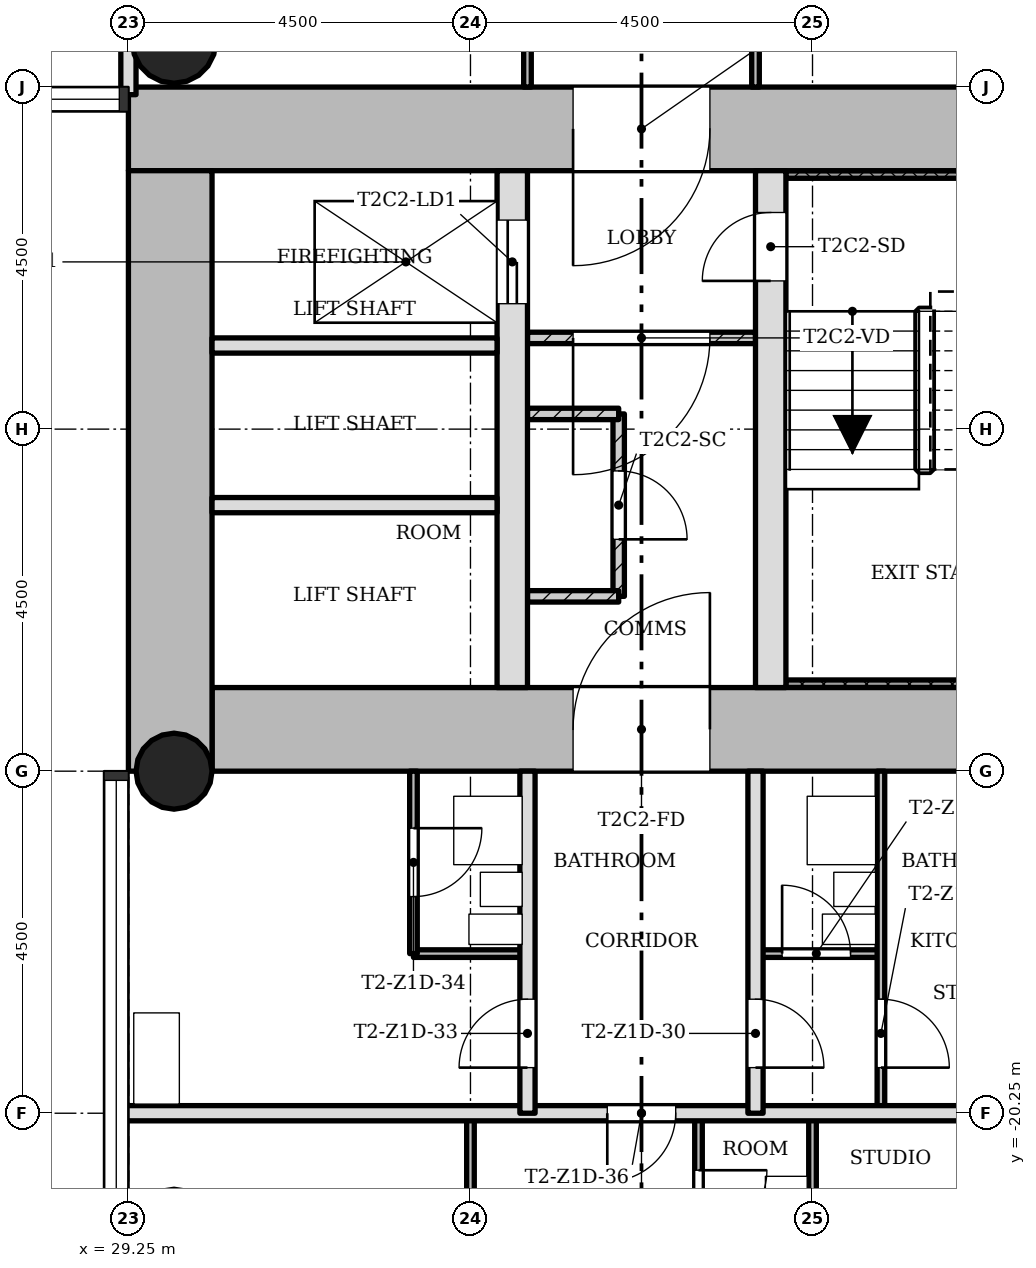
"""IFC4 building model, lengths in metres.
Left out: names, types, materials, properties, quantities, classifications, styles, units other than length and angle.
Written with IfcOpenShell. Run it as: python <this file> out.ifc"""

import sys

from ifc_helpers import new_model, si_unit, direction, frame, frame_2d, origin, origin_2d, place, context, subcontext, project, spatial, rectangle, hollow_circle, extrude, element, fill, save


model = new_model("IFC4")
c1 = context("Model", 3, precision=1e-05, world=origin(), true_north=direction((0.0, 1.0)))
c2 = subcontext(c1, "Body", "Model", "MODEL_VIEW")
j1 = project(units=[si_unit("LENGTHUNIT", "METRE"), si_unit("PLANEANGLEUNIT", "RADIAN")], contexts=[c1])
p1 = place(None, origin())
s1 = spatial("IfcSite", under=j1, at=p1, CompositionType="ELEMENT")
p2 = place(p1, origin())
s2 = spatial("IfcBuilding", under=s1, at=p2, CompositionType="ELEMENT")
p3 = place(p2, frame((0.0, 0.0, 55.1)))
s3 = spatial("IfcBuildingStorey", under=s2, at=p3, CompositionType="ELEMENT", Elevation=55.1)
p4 = place(p3, frame((30.35, -15.2, 0.0), z_axis=(0.0, 0.0, 1.0), x_axis=(1.0, 0.0, 0.0)))
e1 = element("IfcWall", 1, at=p4, inside=s3, PredefinedType="SHEAR", context=c2, shape_type="SweptSolid", body=[
    extrude(rectangle(XDim=12.4, YDim=1.1, at=frame_2d((6.2, 0.0))), origin(), (0.0, 0.0, 1.0), 3.4),
])
p5 = place(p4, frame((4.75, 0.0, 0.0)))
e2 = element("IfcOpeningElement", 2, at=p5, cuts=e1, PredefinedType="OPENING", context=c2, shape_type="SweptSolid", body=[
    extrude(rectangle(XDim=1.8, YDim=2.1, at=frame_2d((0.9, 1.05))), frame((0.0, 0.56, 0.0), z_axis=(0.0, -1.0, 0.0), x_axis=(1.0, 0.0, 0.0)), (0.0, 0.0, 1.0), 1.12),
])
p6 = place(p3, frame((41.65, -7.3, 0.0), z_axis=(0.0, 0.0, 1.0), x_axis=(-1.0, 0.0, 0.0)))
e3 = element("IfcWall", 3, at=p6, inside=s3, PredefinedType="SHEAR", context=c2, shape_type="SweptSolid", body=[
    extrude(rectangle(XDim=12.4, YDim=1.1, at=frame_2d((6.2, 0.0))), origin(), (0.0, 0.0, 1.0), 3.4),
])
p7 = place(p6, frame((4.75, 0.0, 0.0)))
e4 = element("IfcOpeningElement", 4, at=p7, cuts=e3, PredefinedType="OPENING", context=c2, shape_type="SweptSolid", body=[
    extrude(rectangle(XDim=1.8, YDim=2.1, at=frame_2d((0.9, 1.05))), frame((0.0, 0.56, 0.0), z_axis=(0.0, -1.0, 0.0), x_axis=(1.0, 0.0, 0.0)), (0.0, 0.0, 1.0), 1.12),
])
p8 = place(p3, frame((29.8, -7.85, 0.0), z_axis=(0.0, 0.0, 1.0), x_axis=(0.0, -1.0, 0.0)))
e5 = element("IfcWall", 5, at=p8, inside=s3, PredefinedType="SHEAR", context=c2, shape_type="SweptSolid", body=[
    extrude(rectangle(XDim=7.9, YDim=1.1, at=frame_2d((3.95, 0.0))), origin(), (0.0, 0.0, 1.0), 3.4),
])
p9 = place(p3, frame((34.3, -14.65, 0.0), z_axis=(0.0, 0.0, 1.0), x_axis=(0.0, 1.0, 0.0)))
e6 = element("IfcWall", 6, at=p9, inside=s3, PredefinedType="SHEAR", context=c2, shape_type="SweptSolid", body=[
    extrude(rectangle(XDim=6.8, YDim=0.4, at=frame_2d((3.4, 0.0))), origin(), (0.0, 0.0, 1.0), 3.4),
])
p10 = place(p9, frame((5.05, 0.0, 0.0)))
e7 = element("IfcOpeningElement", 7, at=p10, cuts=e6, PredefinedType="OPENING", context=c2, shape_type="SweptSolid", body=[
    extrude(rectangle(XDim=1.1, YDim=2.1, at=frame_2d((0.55, 1.05))), frame((0.0, 0.21, 0.0), z_axis=(0.0, -1.0, 0.0), x_axis=(1.0, 0.0, 0.0)), (0.0, 0.0, 1.0), 0.42),
])
p11 = place(p3, frame((37.7, -14.65, 0.0), z_axis=(0.0, 0.0, 1.0), x_axis=(0.0, 1.0, 0.0)))
e8 = element("IfcWall", 8, at=p11, inside=s3, PredefinedType="SHEAR", context=c2, shape_type="SweptSolid", body=[
    extrude(rectangle(XDim=6.8, YDim=0.4, at=frame_2d((3.4, 0.0))), origin(), (0.0, 0.0, 1.0), 3.4),
])
p12 = place(p11, frame((5.35, 0.0, 0.0)))
e9 = element("IfcOpeningElement", 9, at=p12, cuts=e8, PredefinedType="OPENING", context=c2, shape_type="SweptSolid", body=[
    extrude(rectangle(XDim=0.9, YDim=2.1, at=frame_2d((0.45, 1.05))), frame((0.0, 0.21, 0.0), z_axis=(0.0, -1.0, 0.0), x_axis=(1.0, 0.0, 0.0)), (0.0, 0.0, 1.0), 0.42),
])
p13 = place(p3, frame((29.85, -15.75, 0.0), z_axis=(0.0, 0.0, 1.0), x_axis=(1.0, 0.0, 0.0)))
e10 = element("IfcColumn", 10, at=p13, inside=s3, PredefinedType="COLUMN", context=c2, shape_type="SweptSolid", body=[
    extrude(hollow_circle(Radius=0.5, WallThickness=0.036, at=origin_2d()), origin(), (0.0, 0.0, 1.0), 3.4),
])
p14 = place(p3, frame((29.85, -6.15, 0.0), z_axis=(0.0, 0.0, 1.0), x_axis=(1.0, 0.0, 0.0)))
e11 = element("IfcColumn", 11, at=p14, inside=s3, PredefinedType="COLUMN", context=c2, shape_type="SweptSolid", body=[
    extrude(hollow_circle(Radius=0.55, WallThickness=0.04, at=origin_2d()), origin(), (0.0, 0.0, 1.0), 3.4),
])
p15 = place(p3, frame((34.5, -10.05, 0.0), z_axis=(0.0, 0.0, 1.0), x_axis=(1.0, 0.0, 0.0)))
e12 = element("IfcWall", 12, at=p15, inside=s3, PredefinedType="PARTITIONING", context=c2, shape_type="SweptSolid", body=[
    extrude(rectangle(XDim=3.0, YDim=0.15, at=frame_2d((1.5, 0.0))), origin(), (0.0, 0.0, 1.0), 3.0),
])
p16 = place(p15, frame((0.6, 0.0, 0.0)))
e13 = element("IfcOpeningElement", 13, at=p16, cuts=e12, PredefinedType="OPENING", context=c2, shape_type="SweptSolid", body=[
    extrude(rectangle(XDim=1.8, YDim=2.1, at=frame_2d((0.9, 1.05))), frame((0.0, 0.085, 0.0), z_axis=(0.0, -1.0, 0.0), x_axis=(1.0, 0.0, 0.0)), (0.0, 0.0, 1.0), 0.17),
])
for number, where, z_axis, x_axis in (
    (14, (30.35, -10.15, 0.0), (0.0, 0.0, 1.0), (1.0, 0.0, 0.0)),
    (15, (30.35, -12.25, 0.0), (0.0, 0.0, 1.0), (1.0, 0.0, 0.0)),
):
    element("IfcWall", number, at=place(p3, frame(where, z_axis=z_axis, x_axis=x_axis)), inside=s3, PredefinedType="SOLIDWALL", context=c2, shape_type="SweptSolid", body=[
        extrude(rectangle(XDim=3.75, YDim=0.2, at=frame_2d((1.875, 0.0))), origin(), (0.0, 0.0, 1.0), 3.0),
    ])
p17 = place(p3, frame((35.7, -11.05, 0.0), z_axis=(0.0, 0.0, 1.0), x_axis=(0.0, -1.0, 0.0)))
e16 = element("IfcWall", 16, at=p17, inside=s3, PredefinedType="PARTITIONING", context=c2, shape_type="SweptSolid", body=[
    extrude(rectangle(XDim=2.4, YDim=0.15, at=frame_2d((1.2, 0.0))), origin(), (0.0, 0.0, 1.0), 3.0),
])
p18 = place(p17, frame((0.75, 0.0, 0.0)))
e17 = element("IfcOpeningElement", 17, at=p18, cuts=e16, PredefinedType="OPENING", context=c2, shape_type="SweptSolid", body=[
    extrude(rectangle(XDim=0.9, YDim=2.1, at=frame_2d((0.45, 1.05))), frame((0.0, 0.085, 0.0), z_axis=(0.0, -1.0, 0.0), x_axis=(1.0, 0.0, 0.0)), (0.0, 0.0, 1.0), 0.17),
])
for number, where, z_axis, x_axis in (
    (18, (35.7, -11.05, 0.0), (0.0, 0.0, 1.0), (-1.0, 0.0, 0.0)),
    (19, (35.7, -13.45, 0.0), (0.0, 0.0, 1.0), (-1.0, 0.0, 0.0)),
):
    element("IfcWall", number, at=place(p3, frame(where, z_axis=z_axis, x_axis=x_axis)), inside=s3, PredefinedType="PARTITIONING", context=c2, shape_type="SweptSolid", body=[
        extrude(rectangle(XDim=1.2, YDim=0.15, at=frame_2d((0.6, 0.0))), origin(), (0.0, 0.0, 1.0), 3.0),
    ])
p19 = place(p3, frame((42.85, -20.25, 0.0), z_axis=(0.0, 0.0, 1.0), x_axis=(-1.0, 0.0, 0.0)))
e20 = element("IfcWall", 20, at=p19, inside=s3, PredefinedType="SOLIDWALL", context=c2, shape_type="SweptSolid", body=[
    extrude(rectangle(XDim=13.7, YDim=0.2, at=frame_2d((6.85, 0.0))), origin(), (0.0, 0.0, 1.0), 3.0),
])
p20 = place(p19, frame((6.4, 0.0, 0.0)))
e21 = element("IfcOpeningElement", 21, at=p20, cuts=e20, PredefinedType="OPENING", context=c2, shape_type="SweptSolid", body=[
    extrude(rectangle(XDim=0.9, YDim=2.1, at=frame_2d((0.45, 1.05))), frame((0.0, 0.11, 0.0), z_axis=(0.0, -1.0, 0.0), x_axis=(1.0, 0.0, 0.0)), (0.0, 0.0, 1.0), 0.22),
])
p21 = place(p3, frame((39.15, -18.15, 0.0), z_axis=(0.0, 0.0, 1.0), x_axis=(-1.0, 0.0, 0.0)))
e22 = element("IfcWall", 22, at=p21, inside=s3, PredefinedType="PARTITIONING", context=c2, shape_type="SweptSolid", body=[
    extrude(rectangle(XDim=1.65, YDim=0.1, at=frame_2d((0.825, 0.0))), origin(), (0.0, 0.0, 1.0), 3.0),
])
p22 = place(p21, frame((0.4, 0.0, 0.0)))
e23 = element("IfcOpeningElement", 23, at=p22, cuts=e22, PredefinedType="OPENING", context=c2, shape_type="SweptSolid", body=[
    extrude(rectangle(XDim=0.9, YDim=2.1, at=frame_2d((0.45, 1.05))), frame((0.0, 0.06, 0.0), z_axis=(0.0, -1.0, 0.0), x_axis=(1.0, 0.0, 0.0)), (0.0, 0.0, 1.0), 0.12),
])
p23 = place(p3, frame((34.5, -18.15, 0.0), z_axis=(0.0, 0.0, 1.0), x_axis=(-1.0, 0.0, 0.0)))
e24 = element("IfcWall", 24, at=p23, inside=s3, PredefinedType="PARTITIONING", context=c2, shape_type="SweptSolid", body=[
    extrude(rectangle(XDim=1.5, YDim=0.1, at=frame_2d((0.75, 0.0))), origin(), (0.0, 0.0, 1.0), 3.0),
])
p24 = place(p3, frame((39.15, -20.25, 0.0), z_axis=(0.0, 0.0, 1.0), x_axis=(0.0, 1.0, 0.0)))
e25 = element("IfcWall", 25, at=p24, inside=s3, PredefinedType="PARTITIONING", context=c2, shape_type="SweptSolid", body=[
    extrude(rectangle(XDim=4.5, YDim=0.1, at=frame_2d((2.25, 0.0))), origin(), (0.0, 0.0, 1.0), 3.0),
])
p25 = place(p24, frame((0.6, 0.0, 0.0)))
e26 = element("IfcOpeningElement", 26, at=p25, cuts=e25, PredefinedType="OPENING", context=c2, shape_type="SweptSolid", body=[
    extrude(rectangle(XDim=0.9, YDim=2.1, at=frame_2d((0.45, 1.05))), frame((0.0, 0.06, 0.0), z_axis=(0.0, -1.0, 0.0), x_axis=(1.0, 0.0, 0.0)), (0.0, 0.0, 1.0), 0.12),
])
p26 = place(p3, frame((38.25, -24.85, 0.0), z_axis=(0.0, 0.0, 1.0), x_axis=(0.0, 1.0, 0.0)))
e27 = element("IfcWall", 27, at=p26, inside=s3, PredefinedType="PARTITIONING", context=c2, shape_type="SweptSolid", body=[
    extrude(rectangle(XDim=4.6, YDim=0.1, at=frame_2d((2.3, 0.0))), origin(), (0.0, 0.0, 1.0), 3.0),
])
p27 = place(p26, frame((1.25, 0.0, 0.0)))
e28 = element("IfcOpeningElement", 28, at=p27, cuts=e27, PredefinedType="OPENING", context=c2, shape_type="SweptSolid", body=[
    extrude(rectangle(XDim=0.9, YDim=2.1, at=frame_2d((0.45, 1.05))), frame((0.0, 0.06, 0.0), z_axis=(0.0, -1.0, 0.0), x_axis=(1.0, 0.0, 0.0)), (0.0, 0.0, 1.0), 0.12),
])
p28 = place(p3, frame((37.5, -6.75, 0.0), z_axis=(0.0, 0.0, 1.0), x_axis=(0.0, 1.0, 0.0)))
e29 = element("IfcWall", 29, at=p28, inside=s3, PredefinedType="PARTITIONING", context=c2, shape_type="SweptSolid", body=[
    extrude(rectangle(XDim=5.85, YDim=0.1, at=frame_2d((2.925, 0.0))), origin(), (0.0, 0.0, 1.0), 3.0),
])
p29 = place(p28, frame((1.575, 0.0, 0.0)))
e30 = element("IfcOpeningElement", 30, at=p29, cuts=e29, PredefinedType="OPENING", context=c2, shape_type="SweptSolid", body=[
    extrude(rectangle(XDim=0.9, YDim=2.1, at=frame_2d((0.45, 1.05))), frame((0.0, 0.06, 0.0), z_axis=(0.0, -1.0, 0.0), x_axis=(1.0, 0.0, 0.0)), (0.0, 0.0, 1.0), 0.12),
])
p30 = place(p3, frame((37.5, -20.25, 0.0), z_axis=(0.0, 0.0, 1.0), x_axis=(0.0, 1.0, 0.0)))
e31 = element("IfcWall", 31, at=p30, inside=s3, PredefinedType="SOLIDWALL", context=c2, shape_type="SweptSolid", body=[
    extrude(rectangle(XDim=4.5, YDim=0.2, at=frame_2d((2.25, 0.0))), origin(), (0.0, 0.0, 1.0), 3.0),
])
p31 = place(p30, frame((0.6, 0.0, 0.0)))
e32 = element("IfcOpeningElement", 32, at=p31, cuts=e31, PredefinedType="OPENING", context=c2, shape_type="SweptSolid", body=[
    extrude(rectangle(XDim=0.9, YDim=2.1, at=frame_2d((0.45, 1.05))), frame((0.0, 0.11, 0.0), z_axis=(0.0, -1.0, 0.0), x_axis=(1.0, 0.0, 0.0)), (0.0, 0.0, 1.0), 0.22),
])
p32 = place(p3, frame((36.75, -22.65, 0.0), z_axis=(0.0, 0.0, 1.0), x_axis=(0.0, 1.0, 0.0)))
e33 = element("IfcWall", 33, at=p32, inside=s3, PredefinedType="PARTITIONING", context=c2, shape_type="SweptSolid", body=[
    extrude(rectangle(XDim=2.4, YDim=0.1, at=frame_2d((1.2, 0.0))), origin(), (0.0, 0.0, 1.0), 3.0),
])
p33 = place(p32, frame((0.75, 0.0, 0.0)))
e34 = element("IfcOpeningElement", 34, at=p33, cuts=e33, PredefinedType="OPENING", context=c2, shape_type="SweptSolid", body=[
    extrude(rectangle(XDim=0.9, YDim=2.1, at=frame_2d((0.45, 1.05))), frame((0.0, 0.06, 0.0), z_axis=(0.0, -1.0, 0.0), x_axis=(1.0, 0.0, 0.0)), (0.0, 0.0, 1.0), 0.12),
])
p34 = place(p3, frame((34.5, -6.75, 0.0), z_axis=(0.0, 0.0, 1.0), x_axis=(0.0, 1.0, 0.0)))
e35 = element("IfcWall", 35, at=p34, inside=s3, PredefinedType="PARTITIONING", context=c2, shape_type="SweptSolid", body=[
    extrude(rectangle(XDim=5.85, YDim=0.1, at=frame_2d((2.925, 0.0))), origin(), (0.0, 0.0, 1.0), 3.0),
])
p35 = place(p34, frame((2.475, 0.0, 0.0)))
e36 = element("IfcOpeningElement", 36, at=p35, cuts=e35, PredefinedType="OPENING", context=c2, shape_type="SweptSolid", body=[
    extrude(rectangle(XDim=0.9, YDim=2.1, at=frame_2d((0.45, 1.05))), frame((0.0, 0.06, 0.0), z_axis=(0.0, -1.0, 0.0), x_axis=(1.0, 0.0, 0.0)), (0.0, 0.0, 1.0), 0.12),
])
p36 = place(p3, frame((34.5, -20.25, 0.0), z_axis=(0.0, 0.0, 1.0), x_axis=(0.0, 1.0, 0.0)))
e37 = element("IfcWall", 37, at=p36, inside=s3, PredefinedType="SOLIDWALL", context=c2, shape_type="SweptSolid", body=[
    extrude(rectangle(XDim=4.5, YDim=0.2, at=frame_2d((2.25, 0.0))), origin(), (0.0, 0.0, 1.0), 3.0),
])
p37 = place(p36, frame((0.6, 0.0, 0.0)))
e38 = element("IfcOpeningElement", 38, at=p37, cuts=e37, PredefinedType="OPENING", context=c2, shape_type="SweptSolid", body=[
    extrude(rectangle(XDim=0.9, YDim=2.1, at=frame_2d((0.45, 1.05))), frame((0.0, 0.11, 0.0), z_axis=(0.0, -1.0, 0.0), x_axis=(1.0, 0.0, 0.0)), (0.0, 0.0, 1.0), 0.22),
])
p38 = place(p3, frame((33.75, -24.85, 0.0), z_axis=(0.0, 0.0, 1.0), x_axis=(0.0, 1.0, 0.0)))
e39 = element("IfcWall", 39, at=p38, inside=s3, PredefinedType="PARTITIONING", context=c2, shape_type="SweptSolid", body=[
    extrude(rectangle(XDim=4.6, YDim=0.1, at=frame_2d((2.3, 0.0))), origin(), (0.0, 0.0, 1.0), 3.0),
])
p39 = place(p38, frame((1.9, 0.0, 0.0)))
e40 = element("IfcOpeningElement", 40, at=p39, cuts=e39, PredefinedType="OPENING", context=c2, shape_type="SweptSolid", body=[
    extrude(rectangle(XDim=0.9, YDim=2.1, at=frame_2d((0.45, 1.05))), frame((0.0, 0.06, 0.0), z_axis=(0.0, -1.0, 0.0), x_axis=(1.0, 0.0, 0.0)), (0.0, 0.0, 1.0), 0.12),
])
p40 = place(p3, frame((33.0, -18.15, 0.0), z_axis=(0.0, 0.0, 1.0), x_axis=(0.0, 1.0, 0.0)))
e41 = element("IfcWall", 41, at=p40, inside=s3, PredefinedType="PARTITIONING", context=c2, shape_type="SweptSolid", body=[
    extrude(rectangle(XDim=2.4, YDim=0.1, at=frame_2d((1.2, 0.0))), origin(), (0.0, 0.0, 1.0), 3.0),
])
p41 = place(p40, frame((0.75, 0.0, 0.0)))
e42 = element("IfcOpeningElement", 42, at=p41, cuts=e41, PredefinedType="OPENING", context=c2, shape_type="SweptSolid", body=[
    extrude(rectangle(XDim=0.9, YDim=2.1, at=frame_2d((0.45, 1.05))), frame((0.0, 0.06, 0.0), z_axis=(0.0, -1.0, 0.0), x_axis=(1.0, 0.0, 0.0)), (0.0, 0.0, 1.0), 0.12),
])
p42 = place(p3, frame((29.25, -6.85, 0.0), z_axis=(0.0, 0.0, 1.0), x_axis=(0.0, 1.0, 0.0)))
e43 = element("IfcWall", 43, at=p42, inside=s3, PredefinedType="SOLIDWALL", context=c2, shape_type="SweptSolid", body=[
    extrude(rectangle(XDim=13.7, YDim=0.2, at=frame_2d((6.85, 0.0))), origin(), (0.0, 0.0, 1.0), 3.0),
])
p43 = place(p42, frame((6.4, 0.0, 0.0)))
e44 = element("IfcOpeningElement", 44, at=p43, cuts=e43, PredefinedType="OPENING", context=c2, shape_type="SweptSolid", body=[
    extrude(rectangle(XDim=0.9, YDim=2.1, at=frame_2d((0.45, 1.05))), frame((0.0, 0.11, 0.0), z_axis=(0.0, -1.0, 0.0), x_axis=(1.0, 0.0, 0.0)), (0.0, 0.0, 1.0), 0.22),
])
for number, where, z_axis, x_axis in (
    (45, (37.9, -14.6, 0.0), (0.0, 0.0, 1.0), (1.0, 0.0, 0.0)),
    (46, (37.9, -7.9, 0.0), (0.0, 0.0, 1.0), (1.0, 0.0, 0.0)),
):
    element("IfcWall", number, at=place(p3, frame(where, z_axis=z_axis, x_axis=x_axis)), inside=s3, PredefinedType="SHEAR", context=c2, shape_type="SweptSolid", body=[
        extrude(rectangle(XDim=3.75, YDim=0.1, at=frame_2d((1.875, 0.0))), origin(), (0.0, 0.0, 1.0), 3.4),
    ])
p44 = place(p16, origin())
e47 = element("IfcDoor", 47, at=p44, inside=s3, OperationType="SINGLE_SWING_LEFT", PredefinedType="DOOR", context=c2, shape_type="SweptSolid", body=[
    extrude(rectangle(XDim=1.8, YDim=2.1, at=frame_2d((0.9, 1.05))), frame((0.0, 0.025, 0.0), z_axis=(0.0, -1.0, 0.0), x_axis=(1.0, 0.0, 0.0)), (0.0, 0.0, 1.0), 0.05),
])
fill(e13, e47)
p45 = place(p18, origin())
e48 = element("IfcDoor", 48, at=p45, inside=s3, OperationType="SINGLE_SWING_LEFT", PredefinedType="DOOR", context=c2, shape_type="SweptSolid", body=[
    extrude(rectangle(XDim=0.9, YDim=2.1, at=frame_2d((0.45, 1.05))), frame((0.0, 0.025, 0.0), z_axis=(0.0, -1.0, 0.0), x_axis=(1.0, 0.0, 0.0)), (0.0, 0.0, 1.0), 0.05),
])
fill(e17, e48)
p46 = place(p31, origin())
e49 = element("IfcDoor", 49, at=p46, inside=s3, OperationType="SINGLE_SWING_LEFT", PredefinedType="DOOR", context=c2, shape_type="SweptSolid", body=[
    extrude(rectangle(XDim=0.9, YDim=2.1, at=frame_2d((0.45, 1.05))), frame((0.0, 0.025, 0.0), z_axis=(0.0, -1.0, 0.0), x_axis=(1.0, 0.0, 0.0)), (0.0, 0.0, 1.0), 0.05),
])
fill(e32, e49)
p47 = place(p25, origin())
e50 = element("IfcDoor", 50, at=p47, inside=s3, OperationType="SINGLE_SWING_LEFT", PredefinedType="DOOR", context=c2, shape_type="SweptSolid", body=[
    extrude(rectangle(XDim=0.9, YDim=2.1, at=frame_2d((0.45, 1.05))), frame((0.0, 0.025, 0.0), z_axis=(0.0, -1.0, 0.0), x_axis=(1.0, 0.0, 0.0)), (0.0, 0.0, 1.0), 0.05),
])
fill(e26, e50)
p48 = place(p22, origin())
e51 = element("IfcDoor", 51, at=p48, inside=s3, OperationType="SINGLE_SWING_RIGHT", PredefinedType="DOOR", context=c2, shape_type="SweptSolid", body=[
    extrude(rectangle(XDim=0.9, YDim=2.1, at=frame_2d((0.45, 1.05))), frame((0.0, 0.025, 0.0), z_axis=(0.0, -1.0, 0.0), x_axis=(1.0, 0.0, 0.0)), (0.0, 0.0, 1.0), 0.05),
])
fill(e23, e51)
p49 = place(p37, origin())
e52 = element("IfcDoor", 52, at=p49, inside=s3, OperationType="SINGLE_SWING_RIGHT", PredefinedType="DOOR", context=c2, shape_type="SweptSolid", body=[
    extrude(rectangle(XDim=0.9, YDim=2.1, at=frame_2d((0.45, 1.05))), frame((0.0, 0.025, 0.0), z_axis=(0.0, -1.0, 0.0), x_axis=(1.0, 0.0, 0.0)), (0.0, 0.0, 1.0), 0.05),
])
fill(e38, e52)
p50 = place(p41, origin())
e53 = element("IfcDoor", 53, at=p50, inside=s3, OperationType="SINGLE_SWING_RIGHT", PredefinedType="DOOR", context=c2, shape_type="SweptSolid", body=[
    extrude(rectangle(XDim=0.9, YDim=2.1, at=frame_2d((0.45, 1.05))), frame((0.0, 0.025, 0.0), z_axis=(0.0, -1.0, 0.0), x_axis=(1.0, 0.0, 0.0)), (0.0, 0.0, 1.0), 0.05),
])
fill(e42, e53)
p51 = place(p33, origin())
e54 = element("IfcDoor", 54, at=p51, inside=s3, OperationType="SINGLE_SWING_RIGHT", PredefinedType="DOOR", context=c2, shape_type="SweptSolid", body=[
    extrude(rectangle(XDim=0.9, YDim=2.1, at=frame_2d((0.45, 1.05))), frame((0.0, 0.025, 0.0), z_axis=(0.0, -1.0, 0.0), x_axis=(1.0, 0.0, 0.0)), (0.0, 0.0, 1.0), 0.05),
])
fill(e34, e54)
p52 = place(p20, origin())
e55 = element("IfcDoor", 55, at=p52, inside=s3, OperationType="SINGLE_SWING_LEFT", PredefinedType="DOOR", context=c2, shape_type="SweptSolid", body=[
    extrude(rectangle(XDim=0.9, YDim=2.1, at=frame_2d((0.45, 1.05))), frame((0.0, 0.025, 0.0), z_axis=(0.0, -1.0, 0.0), x_axis=(1.0, 0.0, 0.0)), (0.0, 0.0, 1.0), 0.05),
])
fill(e21, e55)
p53 = place(p12, origin())
e56 = element("IfcDoor", 56, at=p53, inside=s3, OperationType="SINGLE_SWING_RIGHT", PredefinedType="DOOR", context=c2, shape_type="SweptSolid", body=[
    extrude(rectangle(XDim=0.9, YDim=2.1, at=frame_2d((0.45, 1.05))), frame((0.0, 0.025, 0.0), z_axis=(0.0, -1.0, 0.0), x_axis=(1.0, 0.0, 0.0)), (0.0, 0.0, 1.0), 0.05),
])
fill(e9, e56)
p54 = place(p10, origin())
e57 = element("IfcDoor", 57, at=p54, inside=s3, OperationType="SLIDING_TO_LEFT", PredefinedType="DOOR", context=c2, shape_type="SweptSolid", body=[
    extrude(rectangle(XDim=1.1, YDim=2.1, at=frame_2d((0.55, 1.05))), frame((0.0, 0.025, 0.0), z_axis=(0.0, -1.0, 0.0), x_axis=(1.0, 0.0, 0.0)), (0.0, 0.0, 1.0), 0.05),
])
fill(e7, e57)
p55 = place(p7, origin())
e58 = element("IfcDoor", 58, at=p55, inside=s3, OperationType="SINGLE_SWING_LEFT", PredefinedType="DOOR", context=c2, shape_type="SweptSolid", body=[
    extrude(rectangle(XDim=1.8, YDim=2.1, at=frame_2d((0.9, 1.05))), frame((0.0, 0.025, 0.0), z_axis=(0.0, -1.0, 0.0), x_axis=(1.0, 0.0, 0.0)), (0.0, 0.0, 1.0), 0.05),
])
fill(e4, e58)
p56 = place(p5, origin())
e59 = element("IfcDoor", 59, at=p56, inside=s3, OperationType="SINGLE_SWING_LEFT", PredefinedType="DOOR", context=c2, shape_type="SweptSolid", body=[
    extrude(rectangle(XDim=1.8, YDim=2.1, at=frame_2d((0.9, 1.05))), frame((0.0, 0.025, 0.0), z_axis=(0.0, -1.0, 0.0), x_axis=(1.0, 0.0, 0.0)), (0.0, 0.0, 1.0), 0.05),
])
fill(e2, e59)
save(model, sys.argv[1])
